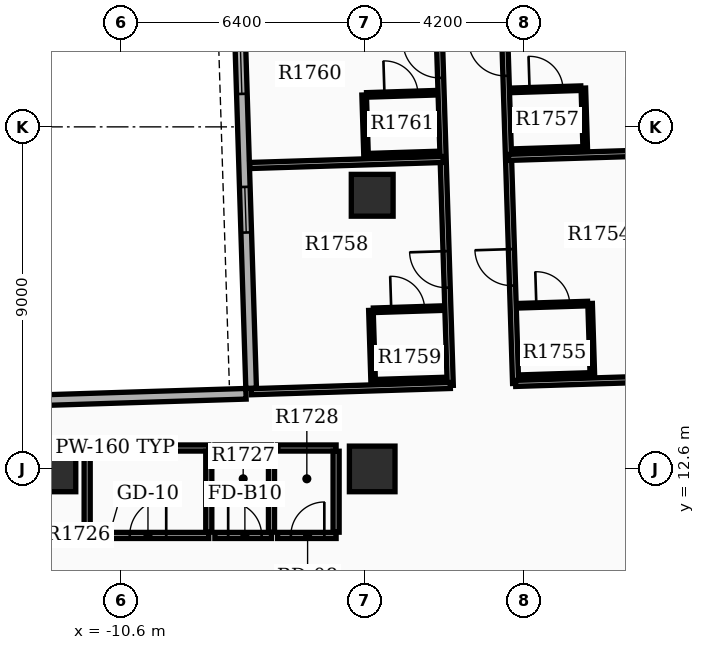
"""IFC4 building model, lengths in metres.
Left out: names, types, materials, properties, quantities, classifications, styles, units other than length and angle.
Written with IfcOpenShell. Run it as: python <this file> out.ifc"""

import sys

from ifc_helpers import new_model, si_unit, direction, frame, frame_2d, origin, origin_2d, place, context, subcontext, project, spatial, rectangle, extrude, element, fill, save


model = new_model("IFC4")
c1 = context("Model", 3, precision=1e-05, world=origin(), true_north=direction((0.0, 1.0)))
c2 = subcontext(c1, "Body", "Model", "MODEL_VIEW")
j1 = project(units=[si_unit("LENGTHUNIT", "METRE"), si_unit("PLANEANGLEUNIT", "RADIAN")], contexts=[c1])
p1 = place(None, origin())
s1 = spatial("IfcSite", under=j1, at=p1, CompositionType="ELEMENT")
p2 = place(p1, origin())
s2 = spatial("IfcBuilding", under=s1, at=p2, CompositionType="ELEMENT")
p3 = place(p2, frame((0.0, 0.0, 112.5)))
s3 = spatial("IfcBuildingStorey", under=s2, at=p3, CompositionType="ELEMENT", Elevation=112.5)
for number, where, z_axis, x_axis in (
    (1, (-12.4, 12.6, 0.0), (0.0, 0.0, 1.0), (1.0, 0.0, 0.0)),
    (2, (-4.0, 12.6, 0.0), (0.0, 0.0, 1.0), (1.0, 0.0, 0.0)),
):
    element("IfcColumn", number, at=place(p3, frame(where, z_axis=z_axis, x_axis=x_axis)), inside=s3, PredefinedType="COLUMN", context=c2, shape_type="SweptSolid", body=[
        extrude(rectangle(XDim=1.2, YDim=1.2, at=origin_2d()), origin(), (0.0, 0.0, 1.0), 3.9),
    ])
p4 = place(p3, frame((-4.0, 19.8, 0.0), z_axis=(0.0, 0.0, 1.0), x_axis=(1.0, 0.0, 0.0)))
e3 = element("IfcColumn", 3, at=p4, inside=s3, PredefinedType="COLUMN", context=c2, shape_type="SweptSolid", body=[
    extrude(rectangle(XDim=1.1, YDim=1.1, at=origin_2d()), origin(), (0.0, 0.0, 1.0), 3.9),
])
p5 = place(p3, frame((-7.817, 34.812, 0.0), z_axis=(0.0, 0.0, 1.0), x_axis=(0.031410322165, -0.999506574096, 0.0)))
e4 = element("IfcWall", 4, at=p5, inside=s3, PredefinedType="STANDARD", context=c2, shape_type="SweptSolid", body=[
    extrude(rectangle(XDim=20.1, YDim=0.28, at=frame_2d((10.05, 0.0))), origin(), (0.0, 0.0, 1.0), 2.97),
])
p6 = place(p5, frame((0.85, 0.0, 0.8)))
e5 = element("IfcOpeningElement", 5, at=p6, cuts=e4, PredefinedType="OPENING", context=c2, shape_type="SweptSolid", body=[
    extrude(rectangle(XDim=1.4, YDim=1.6, at=frame_2d((0.7, 0.8))), frame((0.0, 0.15, 0.0), z_axis=(0.0, -1.0, 0.0), x_axis=(1.0, 0.0, 0.0)), (0.0, 0.0, 1.0), 0.3),
])
p7 = place(p5, frame((4.05, 0.0, 0.8)))
e6 = element("IfcOpeningElement", 6, at=p7, cuts=e4, PredefinedType="OPENING", context=c2, shape_type="SweptSolid", body=[
    extrude(rectangle(XDim=1.4, YDim=1.6, at=frame_2d((0.7, 0.8))), frame((0.0, 0.15, 0.0), z_axis=(0.0, -1.0, 0.0), x_axis=(1.0, 0.0, 0.0)), (0.0, 0.0, 1.0), 0.3),
])
p8 = place(p5, frame((7.25, 0.0, 0.8)))
e7 = element("IfcOpeningElement", 7, at=p8, cuts=e4, PredefinedType="OPENING", context=c2, shape_type="SweptSolid", body=[
    extrude(rectangle(XDim=1.4, YDim=1.6, at=frame_2d((0.7, 0.8))), frame((0.0, 0.15, 0.0), z_axis=(0.0, -1.0, 0.0), x_axis=(1.0, 0.0, 0.0)), (0.0, 0.0, 1.0), 0.3),
])
p9 = place(p5, frame((10.95, 0.0, 0.8)))
e8 = element("IfcOpeningElement", 8, at=p9, cuts=e4, PredefinedType="OPENING", context=c2, shape_type="SweptSolid", body=[
    extrude(rectangle(XDim=1.4, YDim=1.6, at=frame_2d((0.7, 0.8))), frame((0.0, 0.15, 0.0), z_axis=(0.0, -1.0, 0.0), x_axis=(1.0, 0.0, 0.0)), (0.0, 0.0, 1.0), 0.3),
])
p10 = place(p5, frame((14.799, 0.0, 0.85)))
e9 = element("IfcOpeningElement", 9, at=p10, cuts=e4, PredefinedType="OPENING", context=c2, shape_type="SweptSolid", body=[
    extrude(rectangle(XDim=1.2, YDim=1.6, at=frame_2d((0.6, 0.8))), frame((0.0, 0.15, 0.0), z_axis=(0.0, -1.0, 0.0), x_axis=(1.0, 0.0, 0.0)), (0.0, 0.0, 1.0), 0.3),
])
p11 = place(p3, frame((-13.618, 14.379, 0.0), z_axis=(0.0, 0.0, 1.0), x_axis=(0.999507224741, 0.031389611199, 0.0)))
e10 = element("IfcWall", 10, at=p11, inside=s3, PredefinedType="STANDARD", context=c2, shape_type="SweptSolid", body=[
    extrude(rectangle(XDim=6.3, YDim=0.28, at=frame_2d((3.15, 0.0))), origin(), (0.0, 0.0, 1.0), 2.97),
])
p12 = place(p3, frame((-11.5, 10.85, 0.0), z_axis=(0.0, 0.0, 1.0), x_axis=(1.0, 0.0, 0.0)))
e11 = element("IfcWall", 11, at=p12, inside=s3, PredefinedType="PARTITIONING", context=c2, shape_type="SweptSolid", body=[
    extrude(rectangle(XDim=3.2, YDim=0.16, at=frame_2d((1.6, 0.0))), origin(), (0.0, 0.0, 1.0), 2.96),
])
p13 = place(p12, frame((1.12, 0.0, 0.0)))
e12 = element("IfcOpeningElement", 12, at=p13, cuts=e11, PredefinedType="OPENING", context=c2, shape_type="SweptSolid", body=[
    extrude(rectangle(XDim=0.96, YDim=2.15, at=frame_2d((0.48, 1.075))), frame((0.0, 0.09, 0.0), z_axis=(0.0, -1.0, 0.0), x_axis=(1.0, 0.0, 0.0)), (0.0, 0.0, 1.0), 0.18),
])
p14 = place(p3, frame((-11.5, 13.15, 0.0), z_axis=(0.0, 0.0, 1.0), x_axis=(1.0, 0.0, 0.0)))
e13 = element("IfcWall", 13, at=p14, inside=s3, PredefinedType="PARTITIONING", context=c2, shape_type="SweptSolid", body=[
    extrude(rectangle(XDim=3.2, YDim=0.16, at=frame_2d((1.6, 0.0))), origin(), (0.0, 0.0, 1.0), 2.96),
])
for number, where, z_axis, x_axis in (
    (14, (-11.5, 10.935, 0.0), (0.0, 0.0, 1.0), (0.0, 1.0, 0.0)),
    (15, (-8.3, 10.935, 0.0), (0.0, 0.0, 1.0), (0.0, 1.0, 0.0)),
):
    element("IfcWall", number, at=place(p3, frame(where, z_axis=z_axis, x_axis=x_axis)), inside=s3, PredefinedType="PARTITIONING", context=c2, shape_type="SweptSolid", body=[
        extrude(rectangle(XDim=2.13, YDim=0.16, at=frame_2d((1.065, 0.0))), origin(), (0.0, 0.0, 1.0), 2.96),
    ])
p15 = place(p3, frame((-8.14, 10.85, 0.0), z_axis=(0.0, 0.0, 1.0), x_axis=(1.0, 0.0, 0.0)))
e16 = element("IfcWall", 16, at=p15, inside=s3, PredefinedType="PARTITIONING", context=c2, shape_type="SweptSolid", body=[
    extrude(rectangle(XDim=1.49, YDim=0.16, at=frame_2d((0.745, 0.0))), origin(), (0.0, 0.0, 1.0), 2.96),
])
p16 = place(p15, frame((0.35, 0.0, 0.0)))
e17 = element("IfcOpeningElement", 17, at=p16, cuts=e16, PredefinedType="OPENING", context=c2, shape_type="SweptSolid", body=[
    extrude(rectangle(XDim=0.88, YDim=2.1, at=frame_2d((0.44, 1.05))), frame((0.0, 0.09, 0.0), z_axis=(0.0, -1.0, 0.0), x_axis=(1.0, 0.0, 0.0)), (0.0, 0.0, 1.0), 0.18),
])
p17 = place(p3, frame((-8.14, 13.15, 0.0), z_axis=(0.0, 0.0, 1.0), x_axis=(1.0, 0.0, 0.0)))
e18 = element("IfcWall", 18, at=p17, inside=s3, PredefinedType="PARTITIONING", context=c2, shape_type="SweptSolid", body=[
    extrude(rectangle(XDim=1.49, YDim=0.16, at=frame_2d((0.745, 0.0))), origin(), (0.0, 0.0, 1.0), 2.96),
])
p18 = place(p3, frame((-6.65, 10.935, 0.0), z_axis=(0.0, 0.0, 1.0), x_axis=(0.0, 1.0, 0.0)))
e19 = element("IfcWall", 19, at=p18, inside=s3, PredefinedType="PARTITIONING", context=c2, shape_type="SweptSolid", body=[
    extrude(rectangle(XDim=2.13, YDim=0.16, at=frame_2d((1.065, 0.0))), origin(), (0.0, 0.0, 1.0), 2.96),
])
p19 = place(p3, frame((-6.49, 10.85, 0.0), z_axis=(0.0, 0.0, 1.0), x_axis=(1.0, 0.0, 0.0)))
e20 = element("IfcWall", 20, at=p19, inside=s3, PredefinedType="PARTITIONING", context=c2, shape_type="SweptSolid", body=[
    extrude(rectangle(XDim=1.54, YDim=0.16, at=frame_2d((0.77, 0.0))), origin(), (0.0, 0.0, 1.0), 2.96),
])
p20 = place(p19, frame((0.35, 0.0, 0.0)))
e21 = element("IfcOpeningElement", 21, at=p20, cuts=e20, PredefinedType="OPENING", context=c2, shape_type="SweptSolid", body=[
    extrude(rectangle(XDim=0.88, YDim=2.15, at=frame_2d((0.44, 1.075))), frame((0.0, 0.09, 0.0), z_axis=(0.0, -1.0, 0.0), x_axis=(1.0, 0.0, 0.0)), (0.0, 0.0, 1.0), 0.18),
])
p21 = place(p3, frame((-6.49, 13.15, 0.0), z_axis=(0.0, 0.0, 1.0), x_axis=(1.0, 0.0, 0.0)))
e22 = element("IfcWall", 22, at=p21, inside=s3, PredefinedType="PARTITIONING", context=c2, shape_type="SweptSolid", body=[
    extrude(rectangle(XDim=1.54, YDim=0.16, at=frame_2d((0.77, 0.0))), origin(), (0.0, 0.0, 1.0), 2.96),
])
p22 = place(p3, frame((-4.95, 10.935, 0.0), z_axis=(0.0, 0.0, 1.0), x_axis=(0.0, 1.0, 0.0)))
e23 = element("IfcWall", 23, at=p22, inside=s3, PredefinedType="PARTITIONING", context=c2, shape_type="SweptSolid", body=[
    extrude(rectangle(XDim=2.13, YDim=0.16, at=frame_2d((1.065, 0.0))), origin(), (0.0, 0.0, 1.0), 2.96),
])
p23 = place(p3, frame((-0.227, 14.85, 0.0), z_axis=(0.0, 0.0, 1.0), x_axis=(-0.031410762168, 0.999506560269, 0.0)))
e24 = element("IfcWall", 24, at=p23, inside=s3, PredefinedType="PARTITIONING", context=c2, shape_type="SweptSolid", body=[
    extrude(rectangle(XDim=9.7, YDim=0.16, at=frame_2d((4.85, 0.0))), origin(), (0.0, 0.0, 1.0), 2.96),
])
p24 = place(p23, frame((2.575, 0.0, 0.0)))
e25 = element("IfcOpeningElement", 25, at=p24, cuts=e24, PredefinedType="OPENING", context=c2, shape_type="SweptSolid", body=[
    extrude(rectangle(XDim=0.96, YDim=2.15, at=frame_2d((0.48, 1.075))), frame((0.0, 0.09, 0.0), z_axis=(0.0, -1.0, 0.0), x_axis=(1.0, 0.0, 0.0)), (0.0, 0.0, 1.0), 0.18),
])
p25 = place(p23, frame((8.097, 0.0, 0.0)))
e26 = element("IfcOpeningElement", 26, at=p25, cuts=e24, PredefinedType="OPENING", context=c2, shape_type="SweptSolid", body=[
    extrude(rectangle(XDim=0.96, YDim=2.15, at=frame_2d((0.48, 1.075))), frame((0.0, 0.09, 0.0), z_axis=(0.0, -1.0, 0.0), x_axis=(1.0, 0.0, 0.0)), (0.0, 0.0, 1.0), 0.18),
])
p26 = place(p3, frame((-0.227, 14.85, 0.0), z_axis=(0.0, 0.0, 1.0), x_axis=(0.999506214218, 0.031421771746, 0.0)))
e27 = element("IfcWall", 27, at=p26, inside=s3, PredefinedType="PARTITIONING", context=c2, shape_type="SweptSolid", body=[
    extrude(rectangle(XDim=6.48, YDim=0.16, at=frame_2d((3.24, 0.0))), origin(), (0.0, 0.0, 1.0), 2.96),
])
p27 = place(p3, frame((-0.414, 20.797, 0.0), z_axis=(0.0, 0.0, 1.0), x_axis=(0.999507362715, 0.0313852175, 0.0)))
e28 = element("IfcWall", 28, at=p27, inside=s3, PredefinedType="PARTITIONING", context=c2, shape_type="SweptSolid", body=[
    extrude(rectangle(XDim=6.332, YDim=0.16, at=frame_2d((3.166, 0.0))), origin(), (0.0, 0.0, 1.0), 2.96),
])
p28 = place(p3, frame((-0.151, 16.894, 0.0), z_axis=(0.0, 0.0, 1.0), x_axis=(0.999507221803, 0.031389704724, 0.0)))
e29 = element("IfcWall", 29, at=p28, inside=s3, PredefinedType="PARTITIONING", context=c2, shape_type="SweptSolid", body=[
    extrude(rectangle(XDim=1.82, YDim=0.12, at=frame_2d((0.91, 0.0))), origin(), (0.0, 0.0, 1.0), 2.96),
])
p29 = place(p28, frame((0.47, 0.0, 0.0)))
e30 = element("IfcOpeningElement", 30, at=p29, cuts=e29, PredefinedType="OPENING", context=c2, shape_type="SweptSolid", body=[
    extrude(rectangle(XDim=0.88, YDim=2.1, at=frame_2d((0.44, 1.05))), frame((0.0, 0.07, 0.0), z_axis=(0.0, -1.0, 0.0), x_axis=(1.0, 0.0, 0.0)), (0.0, 0.0, 1.0), 0.14),
])
p30 = place(p3, frame((-0.092, 15.014, 0.0), z_axis=(0.0, 0.0, 1.0), x_axis=(0.999503004171, 0.03152371574, 0.0)))
e31 = element("IfcWall", 31, at=p30, inside=s3, PredefinedType="PARTITIONING", context=c2, shape_type="SweptSolid", body=[
    extrude(rectangle(XDim=1.82, YDim=0.12, at=frame_2d((0.91, 0.0))), origin(), (0.0, 0.0, 1.0), 2.96),
])
p31 = place(p3, frame((1.792, 15.074, 0.0), z_axis=(0.0, 0.0, 1.0), x_axis=(-0.031425292588, 0.999506103526, 0.0)))
e32 = element("IfcWall", 32, at=p31, inside=s3, PredefinedType="PARTITIONING", context=c2, shape_type="SweptSolid", body=[
    extrude(rectangle(XDim=1.88, YDim=0.12, at=frame_2d((0.94, 0.0))), origin(), (0.0, 0.0, 1.0), 2.96),
])
p32 = place(p3, frame((-0.329, 22.561, 0.0), z_axis=(0.0, 0.0, 1.0), x_axis=(0.999507221803, 0.031389704724, 0.0)))
e33 = element("IfcWall", 33, at=p32, inside=s3, PredefinedType="PARTITIONING", context=c2, shape_type="SweptSolid", body=[
    extrude(rectangle(XDim=1.82, YDim=0.12, at=frame_2d((0.91, 0.0))), origin(), (0.0, 0.0, 1.0), 2.96),
])
p33 = place(p32, frame((0.47, 0.0, 0.0)))
e34 = element("IfcOpeningElement", 34, at=p33, cuts=e33, PredefinedType="OPENING", context=c2, shape_type="SweptSolid", body=[
    extrude(rectangle(XDim=0.88, YDim=2.1, at=frame_2d((0.44, 1.05))), frame((0.0, 0.07, 0.0), z_axis=(0.0, -1.0, 0.0), x_axis=(1.0, 0.0, 0.0)), (0.0, 0.0, 1.0), 0.14),
])
p34 = place(p3, frame((-0.279, 20.962, 0.0), z_axis=(0.0, 0.0, 1.0), x_axis=(0.999507221803, 0.031389704724, 0.0)))
e35 = element("IfcWall", 35, at=p34, inside=s3, PredefinedType="PARTITIONING", context=c2, shape_type="SweptSolid", body=[
    extrude(rectangle(XDim=1.82, YDim=0.12, at=frame_2d((0.91, 0.0))), origin(), (0.0, 0.0, 1.0), 2.96),
])
p35 = place(p3, frame((1.605, 21.021, 0.0), z_axis=(0.0, 0.0, 1.0), x_axis=(-0.031277621856, 0.999510735496, 0.0)))
e36 = element("IfcWall", 36, at=p35, inside=s3, PredefinedType="PARTITIONING", context=c2, shape_type="SweptSolid", body=[
    extrude(rectangle(XDim=1.6, YDim=0.12, at=frame_2d((0.8, 0.0))), origin(), (0.0, 0.0, 1.0), 2.96),
])
p36 = place(p3, frame((-1.946, 14.796, 0.0), z_axis=(0.0, 0.0, 1.0), x_axis=(-0.031410762168, 0.999506560269, 0.0)))
e37 = element("IfcWall", 37, at=p36, inside=s3, PredefinedType="PARTITIONING", context=c2, shape_type="SweptSolid", body=[
    extrude(rectangle(XDim=9.7, YDim=0.16, at=frame_2d((4.85, 0.0))), origin(), (0.0, 0.0, 1.0), 2.96),
])
p37 = place(p36, frame((2.575, 0.0, 0.0)))
e38 = element("IfcOpeningElement", 38, at=p37, cuts=e37, PredefinedType="OPENING", context=c2, shape_type="SweptSolid", body=[
    extrude(rectangle(XDim=0.96, YDim=2.15, at=frame_2d((0.48, 1.075))), frame((0.0, 0.09, 0.0), z_axis=(0.0, -1.0, 0.0), x_axis=(1.0, 0.0, 0.0)), (0.0, 0.0, 1.0), 0.18),
])
p38 = place(p36, frame((8.097, 0.0, 0.0)))
e39 = element("IfcOpeningElement", 39, at=p38, cuts=e37, PredefinedType="OPENING", context=c2, shape_type="SweptSolid", body=[
    extrude(rectangle(XDim=0.96, YDim=2.15, at=frame_2d((0.48, 1.075))), frame((0.0, 0.09, 0.0), z_axis=(0.0, -1.0, 0.0), x_axis=(1.0, 0.0, 0.0)), (0.0, 0.0, 1.0), 0.18),
])
p39 = place(p3, frame((-1.946, 14.796, 0.0), z_axis=(0.0, 0.0, 1.0), x_axis=(-0.999506788914, -0.031403485723, 0.0)))
e40 = element("IfcWall", 40, at=p39, inside=s3, PredefinedType="PARTITIONING", context=c2, shape_type="SweptSolid", body=[
    extrude(rectangle(XDim=5.24, YDim=0.16, at=frame_2d((2.62, 0.0))), origin(), (0.0, 0.0, 1.0), 2.96),
])
p40 = place(p3, frame((-2.133, 20.743, 0.0), z_axis=(0.0, 0.0, 1.0), x_axis=(-0.999506776146, -0.031403892089, 0.0)))
e41 = element("IfcWall", 41, at=p40, inside=s3, PredefinedType="PARTITIONING", context=c2, shape_type="SweptSolid", body=[
    extrude(rectangle(XDim=5.092, YDim=0.16, at=frame_2d((2.546, 0.0))), origin(), (0.0, 0.0, 1.0), 2.96),
])
p41 = place(p3, frame((-3.969, 16.774, 0.0), z_axis=(0.0, 0.0, 1.0), x_axis=(0.999507221803, 0.031389704724, 0.0)))
e42 = element("IfcWall", 42, at=p41, inside=s3, PredefinedType="PARTITIONING", context=c2, shape_type="SweptSolid", body=[
    extrude(rectangle(XDim=1.82, YDim=0.12, at=frame_2d((0.91, 0.0))), origin(), (0.0, 0.0, 1.0), 2.96),
])
p42 = place(p41, frame((0.47, 0.0, 0.0)))
e43 = element("IfcOpeningElement", 43, at=p42, cuts=e42, PredefinedType="OPENING", context=c2, shape_type="SweptSolid", body=[
    extrude(rectangle(XDim=0.88, YDim=2.1, at=frame_2d((0.44, 1.05))), frame((0.0, 0.07, 0.0), z_axis=(0.0, -1.0, 0.0), x_axis=(1.0, 0.0, 0.0)), (0.0, 0.0, 1.0), 0.14),
])
p43 = place(p3, frame((-3.91, 14.895, 0.0), z_axis=(0.0, 0.0, 1.0), x_axis=(0.999507221803, 0.031389704724, 0.0)))
e44 = element("IfcWall", 44, at=p43, inside=s3, PredefinedType="PARTITIONING", context=c2, shape_type="SweptSolid", body=[
    extrude(rectangle(XDim=1.82, YDim=0.12, at=frame_2d((0.91, 0.0))), origin(), (0.0, 0.0, 1.0), 2.96),
])
p44 = place(p3, frame((-3.975, 14.893, 0.0), z_axis=(0.0, 0.0, 1.0), x_axis=(-0.031429371883, 0.999505975261, 0.0)))
e45 = element("IfcWall", 45, at=p44, inside=s3, PredefinedType="PARTITIONING", context=c2, shape_type="SweptSolid", body=[
    extrude(rectangle(XDim=1.88, YDim=0.12, at=frame_2d((0.94, 0.0))), origin(), (0.0, 0.0, 1.0), 2.96),
])
p45 = place(p3, frame((-4.147, 22.441, 0.0), z_axis=(0.0, 0.0, 1.0), x_axis=(0.999507221803, 0.031389704724, 0.0)))
e46 = element("IfcWall", 46, at=p45, inside=s3, PredefinedType="PARTITIONING", context=c2, shape_type="SweptSolid", body=[
    extrude(rectangle(XDim=1.82, YDim=0.12, at=frame_2d((0.91, 0.0))), origin(), (0.0, 0.0, 1.0), 2.96),
])
p46 = place(p45, frame((0.47, 0.0, 0.0)))
e47 = element("IfcOpeningElement", 47, at=p46, cuts=e46, PredefinedType="OPENING", context=c2, shape_type="SweptSolid", body=[
    extrude(rectangle(XDim=0.88, YDim=2.1, at=frame_2d((0.44, 1.05))), frame((0.0, 0.07, 0.0), z_axis=(0.0, -1.0, 0.0), x_axis=(1.0, 0.0, 0.0)), (0.0, 0.0, 1.0), 0.14),
])
p47 = place(p3, frame((-4.097, 20.842, 0.0), z_axis=(0.0, 0.0, 1.0), x_axis=(0.999507221803, 0.031389704724, 0.0)))
e48 = element("IfcWall", 48, at=p47, inside=s3, PredefinedType="PARTITIONING", context=c2, shape_type="SweptSolid", body=[
    extrude(rectangle(XDim=1.82, YDim=0.12, at=frame_2d((0.91, 0.0))), origin(), (0.0, 0.0, 1.0), 2.96),
])
p48 = place(p3, frame((-4.162, 20.84, 0.0), z_axis=(0.0, 0.0, 1.0), x_axis=(-0.031434839006, 0.999505803333, 0.0)))
e49 = element("IfcWall", 49, at=p48, inside=s3, PredefinedType="PARTITIONING", context=c2, shape_type="SweptSolid", body=[
    extrude(rectangle(XDim=1.6, YDim=0.12, at=frame_2d((0.8, 0.0))), origin(), (0.0, 0.0, 1.0), 2.96),
])
p49 = place(p9, origin())
e50 = element("IfcWindow", 50, at=p49, inside=s3, PartitioningType="SINGLE_PANEL", PredefinedType="WINDOW", context=c2, shape_type="SweptSolid", body=[
    extrude(rectangle(XDim=1.4, YDim=1.6, at=frame_2d((0.7, 0.8))), frame((0.0, 0.03, 0.0), z_axis=(0.0, -1.0, 0.0), x_axis=(1.0, 0.0, 0.0)), (0.0, 0.0, 1.0), 0.06),
])
fill(e8, e50)
p50 = place(p10, origin())
e51 = element("IfcWindow", 51, at=p50, inside=s3, PartitioningType="SINGLE_PANEL", PredefinedType="WINDOW", context=c2, shape_type="SweptSolid", body=[
    extrude(rectangle(XDim=1.2, YDim=1.6, at=frame_2d((0.6, 0.8))), frame((0.0, 0.03, 0.0), z_axis=(0.0, -1.0, 0.0), x_axis=(1.0, 0.0, 0.0)), (0.0, 0.0, 1.0), 0.06),
])
fill(e9, e51)
p51 = place(p13, origin())
e52 = element("IfcDoor", 52, at=p51, inside=s3, OperationType="SINGLE_SWING_RIGHT", PredefinedType="DOOR", context=c2, shape_type="SweptSolid", body=[
    extrude(rectangle(XDim=0.96, YDim=2.15, at=frame_2d((0.48, 1.075))), frame((0.0, 0.025, 0.0), z_axis=(0.0, -1.0, 0.0), x_axis=(1.0, 0.0, 0.0)), (0.0, 0.0, 1.0), 0.05),
])
fill(e12, e52)
p52 = place(p16, origin())
e53 = element("IfcDoor", 53, at=p52, inside=s3, OperationType="SINGLE_SWING_LEFT", PredefinedType="DOOR", context=c2, shape_type="SweptSolid", body=[
    extrude(rectangle(XDim=0.88, YDim=2.1, at=frame_2d((0.44, 1.05))), frame((0.0, 0.025, 0.0), z_axis=(0.0, -1.0, 0.0), x_axis=(1.0, 0.0, 0.0)), (0.0, 0.0, 1.0), 0.05),
])
fill(e17, e53)
p53 = place(p20, origin())
e54 = element("IfcDoor", 54, at=p53, inside=s3, OperationType="SINGLE_SWING_RIGHT", PredefinedType="DOOR", context=c2, shape_type="SweptSolid", body=[
    extrude(rectangle(XDim=0.88, YDim=2.15, at=frame_2d((0.44, 1.075))), frame((0.0, 0.025, 0.0), z_axis=(0.0, -1.0, 0.0), x_axis=(1.0, 0.0, 0.0)), (0.0, 0.0, 1.0), 0.05),
])
fill(e21, e54)
p54 = place(p24, origin())
e55 = element("IfcDoor", 55, at=p54, inside=s3, OperationType="SINGLE_SWING_RIGHT", PredefinedType="DOOR", context=c2, shape_type="SweptSolid", body=[
    extrude(rectangle(XDim=0.96, YDim=2.15, at=frame_2d((0.48, 1.075))), frame((0.0, 0.025, 0.0), z_axis=(0.0, -1.0, 0.0), x_axis=(1.0, 0.0, 0.0)), (0.0, 0.0, 1.0), 0.05),
])
fill(e25, e55)
p55 = place(p29, origin())
e56 = element("IfcDoor", 56, at=p55, inside=s3, OperationType="SINGLE_SWING_LEFT", PredefinedType="DOOR", context=c2, shape_type="SweptSolid", body=[
    extrude(rectangle(XDim=0.88, YDim=2.1, at=frame_2d((0.44, 1.05))), frame((0.0, 0.025, 0.0), z_axis=(0.0, -1.0, 0.0), x_axis=(1.0, 0.0, 0.0)), (0.0, 0.0, 1.0), 0.05),
])
fill(e30, e56)
p56 = place(p25, origin())
e57 = element("IfcDoor", 57, at=p56, inside=s3, OperationType="SINGLE_SWING_RIGHT", PredefinedType="DOOR", context=c2, shape_type="SweptSolid", body=[
    extrude(rectangle(XDim=0.96, YDim=2.15, at=frame_2d((0.48, 1.075))), frame((0.0, 0.025, 0.0), z_axis=(0.0, -1.0, 0.0), x_axis=(1.0, 0.0, 0.0)), (0.0, 0.0, 1.0), 0.05),
])
fill(e26, e57)
p57 = place(p33, origin())
e58 = element("IfcDoor", 58, at=p57, inside=s3, OperationType="SINGLE_SWING_LEFT", PredefinedType="DOOR", context=c2, shape_type="SweptSolid", body=[
    extrude(rectangle(XDim=0.88, YDim=2.1, at=frame_2d((0.44, 1.05))), frame((0.0, 0.025, 0.0), z_axis=(0.0, -1.0, 0.0), x_axis=(1.0, 0.0, 0.0)), (0.0, 0.0, 1.0), 0.05),
])
fill(e34, e58)
p58 = place(p37, origin())
e59 = element("IfcDoor", 59, at=p58, inside=s3, OperationType="SINGLE_SWING_RIGHT", PredefinedType="DOOR", context=c2, shape_type="SweptSolid", body=[
    extrude(rectangle(XDim=0.96, YDim=2.15, at=frame_2d((0.48, 1.075))), frame((0.0, 0.025, 0.0), z_axis=(0.0, -1.0, 0.0), x_axis=(1.0, 0.0, 0.0)), (0.0, 0.0, 1.0), 0.05),
])
fill(e38, e59)
p59 = place(p42, origin())
e60 = element("IfcDoor", 60, at=p59, inside=s3, OperationType="SINGLE_SWING_LEFT", PredefinedType="DOOR", context=c2, shape_type="SweptSolid", body=[
    extrude(rectangle(XDim=0.88, YDim=2.1, at=frame_2d((0.44, 1.05))), frame((0.0, 0.025, 0.0), z_axis=(0.0, -1.0, 0.0), x_axis=(1.0, 0.0, 0.0)), (0.0, 0.0, 1.0), 0.05),
])
fill(e43, e60)
p60 = place(p38, origin())
e61 = element("IfcDoor", 61, at=p60, inside=s3, OperationType="SINGLE_SWING_RIGHT", PredefinedType="DOOR", context=c2, shape_type="SweptSolid", body=[
    extrude(rectangle(XDim=0.96, YDim=2.15, at=frame_2d((0.48, 1.075))), frame((0.0, 0.025, 0.0), z_axis=(0.0, -1.0, 0.0), x_axis=(1.0, 0.0, 0.0)), (0.0, 0.0, 1.0), 0.05),
])
fill(e39, e61)
p61 = place(p46, origin())
e62 = element("IfcDoor", 62, at=p61, inside=s3, OperationType="SINGLE_SWING_LEFT", PredefinedType="DOOR", context=c2, shape_type="SweptSolid", body=[
    extrude(rectangle(XDim=0.88, YDim=2.1, at=frame_2d((0.44, 1.05))), frame((0.0, 0.025, 0.0), z_axis=(0.0, -1.0, 0.0), x_axis=(1.0, 0.0, 0.0)), (0.0, 0.0, 1.0), 0.05),
])
fill(e47, e62)
save(model, sys.argv[1])
